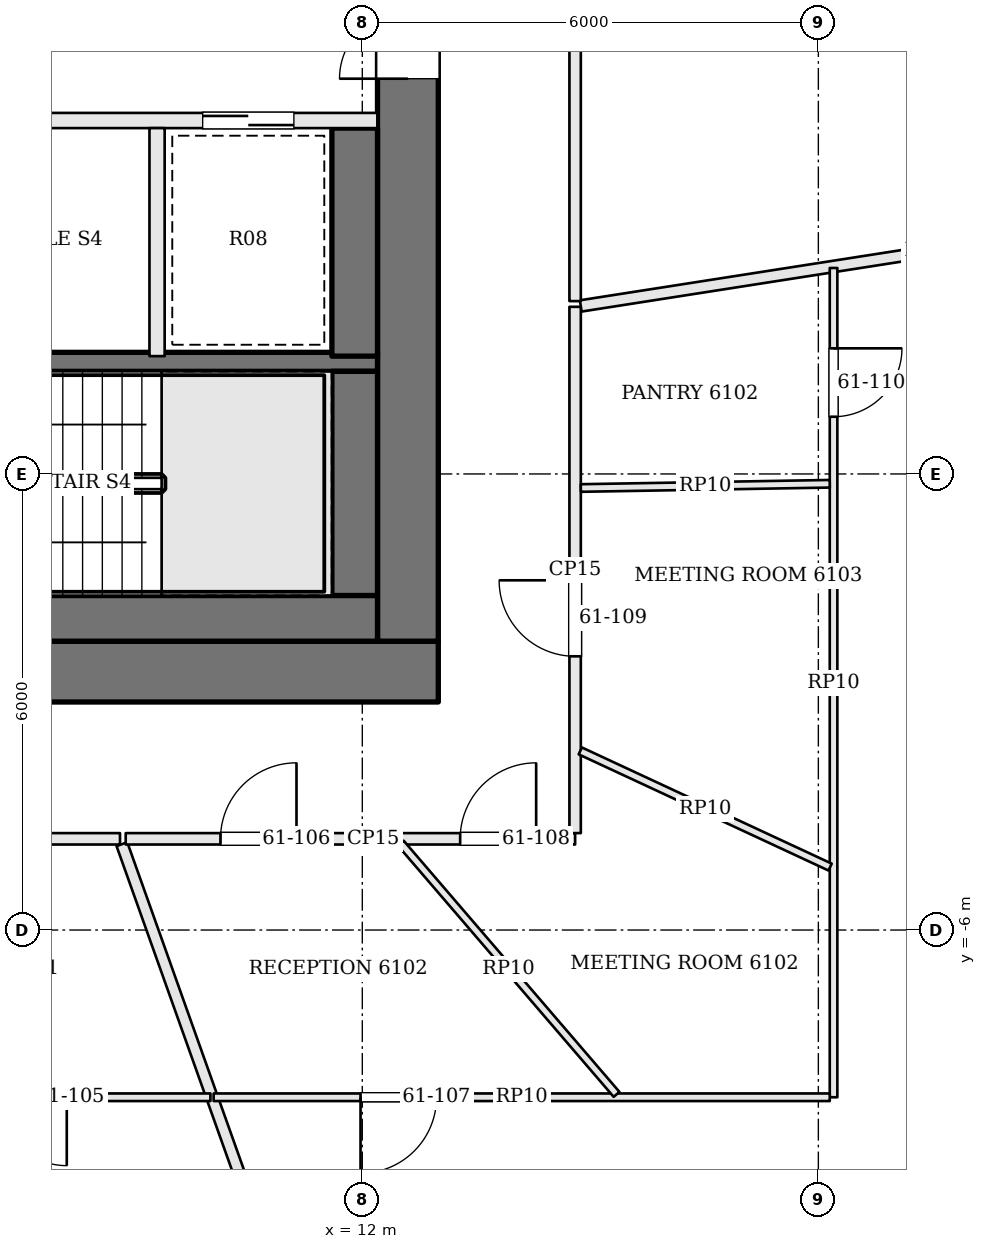
"""IFC4 building model, lengths in metres.
Left out: names, types, materials, properties, quantities, classifications, styles, units other than length and angle.
Written with IfcOpenShell. Run it as: python <this file> out.ifc"""

import sys

from ifc_helpers import new_model, si_unit, direction, frame, frame_2d, origin, place, context, subcontext, project, spatial, rectangle, extrude, element, fill, save


model = new_model("IFC4")
c1 = context("Model", 3, precision=1e-05, world=origin(), true_north=direction((0.0, 1.0)))
c2 = subcontext(c1, "Body", "Model", "MODEL_VIEW")
j1 = project(units=[si_unit("LENGTHUNIT", "METRE"), si_unit("PLANEANGLEUNIT", "RADIAN")], contexts=[c1])
p1 = place(None, origin())
s1 = spatial("IfcSite", under=j1, at=p1, CompositionType="ELEMENT")
p2 = place(p1, origin())
s2 = spatial("IfcBuilding", under=s1, at=p2, CompositionType="ELEMENT")
p3 = place(p2, frame((0.0, 0.0, 248.7)))
s3 = spatial("IfcBuildingStorey", under=s2, at=p3, CompositionType="ELEMENT", Elevation=248.7)
p4 = place(p3, frame((-13.0, -2.6, 0.0), z_axis=(0.0, 0.0, 1.0), x_axis=(1.0, 0.0, 0.0)))
e1 = element("IfcWall", 1, at=p4, inside=s3, PredefinedType="SHEAR", context=c2, shape_type="SweptSolid", body=[
    extrude(rectangle(XDim=26.0, YDim=0.8, at=frame_2d((13.0, 0.0))), origin(), (0.0, 0.0, 1.0), 3.9),
])
p5 = place(p4, frame((9.475, 0.0, 0.0)))
e2 = element("IfcOpeningElement", 2, at=p5, cuts=e1, PredefinedType="OPENING", context=c2, shape_type="SweptSolid", body=[
    extrude(rectangle(XDim=0.9, YDim=2.1, at=frame_2d((0.45, 1.05))), frame((0.0, 0.41, 0.0), z_axis=(0.0, -1.0, 0.0), x_axis=(1.0, 0.0, 0.0)), (0.0, 0.0, 1.0), 0.82),
])
p6 = place(p4, frame((12.75, 0.0, 0.0)))
e3 = element("IfcOpeningElement", 3, at=p6, cuts=e1, PredefinedType="OPENING", context=c2, shape_type="SweptSolid", body=[
    extrude(rectangle(XDim=0.9, YDim=2.1, at=frame_2d((0.45, 1.05))), frame((0.0, 0.41, 0.0), z_axis=(0.0, -1.0, 0.0), x_axis=(1.0, 0.0, 0.0)), (0.0, 0.0, 1.0), 0.82),
])
p7 = place(p4, frame((15.05, 0.0, 0.0)))
e4 = element("IfcOpeningElement", 4, at=p7, cuts=e1, PredefinedType="OPENING", context=c2, shape_type="SweptSolid", body=[
    extrude(rectangle(XDim=1.0, YDim=2.1, at=frame_2d((0.5, 1.05))), frame((0.0, 0.41, 0.0), z_axis=(0.0, -1.0, 0.0), x_axis=(1.0, 0.0, 0.0)), (0.0, 0.0, 1.0), 0.82),
])
p8 = place(p4, frame((16.825, 0.0, 0.0)))
e5 = element("IfcOpeningElement", 5, at=p8, cuts=e1, PredefinedType="OPENING", context=c2, shape_type="SweptSolid", body=[
    extrude(rectangle(XDim=0.7, YDim=2.1, at=frame_2d((0.35, 1.05))), frame((0.0, 0.41, 0.0), z_axis=(0.0, -1.0, 0.0), x_axis=(1.0, 0.0, 0.0)), (0.0, 0.0, 1.0), 0.82),
])
p9 = place(p3, frame((12.6, -2.2, 0.0), z_axis=(0.0, 0.0, 1.0), x_axis=(0.0, 1.0, 0.0)))
e6 = element("IfcWall", 6, at=p9, inside=s3, PredefinedType="SHEAR", context=c2, shape_type="SweptSolid", body=[
    extrude(rectangle(XDim=13.4, YDim=0.8, at=frame_2d((6.7, 0.0))), origin(), (0.0, 0.0, 1.0), 3.9),
])
p10 = place(p9, frame((7.4, 0.0, 0.0)))
e7 = element("IfcOpeningElement", 7, at=p10, cuts=e6, PredefinedType="OPENING", context=c2, shape_type="SweptSolid", body=[
    extrude(rectangle(XDim=1.8, YDim=2.1, at=frame_2d((0.9, 1.05))), frame((0.0, 0.41, 0.0), z_axis=(0.0, -1.0, 0.0), x_axis=(1.0, 0.0, 0.0)), (0.0, 0.0, 1.0), 0.82),
])
p11 = place(p3, frame((12.2, 4.65, 0.0), z_axis=(0.0, 0.0, 1.0), x_axis=(-1.0, 0.0, 0.0)))
e8 = element("IfcWall", 8, at=p11, inside=s3, PredefinedType="SOLIDWALL", context=c2, shape_type="SweptSolid", body=[
    extrude(rectangle(XDim=7.1, YDim=0.2, at=frame_2d((3.55, 0.0))), origin(), (0.0, 0.0, 1.0), 3.7),
])
p12 = place(p11, frame((4.4, 0.0, 0.0)))
e9 = element("IfcOpeningElement", 9, at=p12, cuts=e8, PredefinedType="OPENING", context=c2, shape_type="SweptSolid", body=[
    extrude(rectangle(XDim=1.2, YDim=2.1, at=frame_2d((0.6, 1.05))), frame((0.0, 0.11, 0.0), z_axis=(0.0, -1.0, 0.0), x_axis=(1.0, 0.0, 0.0)), (0.0, 0.0, 1.0), 0.22),
])
p13 = place(p11, frame((1.1, 0.0, 0.0)))
e10 = element("IfcOpeningElement", 10, at=p13, cuts=e8, PredefinedType="OPENING", context=c2, shape_type="SweptSolid", body=[
    extrude(rectangle(XDim=1.2, YDim=2.1, at=frame_2d((0.6, 1.05))), frame((0.0, 0.11, 0.0), z_axis=(0.0, -1.0, 0.0), x_axis=(1.0, 0.0, 0.0)), (0.0, 0.0, 1.0), 0.22),
])
p14 = place(p3, frame((12.2, 1.475, 0.0), z_axis=(0.0, 0.0, 1.0), x_axis=(-1.0, 0.0, 0.0)))
e11 = element("IfcWall", 11, at=p14, inside=s3, PredefinedType="SOLIDWALL", context=c2, shape_type="SweptSolid", body=[
    extrude(rectangle(XDim=7.1, YDim=0.25, at=frame_2d((3.55, 0.0))), origin(), (0.0, 0.0, 1.0), 3.7),
])
p15 = place(p14, frame((5.8, 0.0, 0.0)))
e12 = element("IfcOpeningElement", 12, at=p15, cuts=e11, PredefinedType="OPENING", context=c2, shape_type="SweptSolid", body=[
    extrude(rectangle(XDim=1.2, YDim=2.1, at=frame_2d((0.6, 1.05))), frame((0.0, 0.135, 0.0), z_axis=(0.0, -1.0, 0.0), x_axis=(1.0, 0.0, 0.0)), (0.0, 0.0, 1.0), 0.27),
])
p16 = place(p3, frame((9.3, 4.55, 0.0), z_axis=(0.0, 0.0, 1.0), x_axis=(0.0, -1.0, 0.0)))
e13 = element("IfcWall", 13, at=p16, inside=s3, PredefinedType="SOLIDWALL", context=c2, shape_type="SweptSolid", body=[
    extrude(rectangle(XDim=3.0, YDim=0.2, at=frame_2d((1.5, 0.0))), origin(), (0.0, 0.0, 1.0), 3.7),
])
p17 = place(p3, frame((11.9, 4.55, 0.0), z_axis=(0.0, 0.0, 1.0), x_axis=(0.0, -1.0, 0.0)))
e14 = element("IfcWall", 14, at=p17, inside=s3, PredefinedType="SOLIDWALL", context=c2, shape_type="SweptSolid", body=[
    extrude(rectangle(XDim=3.0, YDim=0.6, at=frame_2d((1.5, 0.0))), origin(), (0.0, 0.0, 1.0), 3.7),
])
p18 = place(p3, frame((11.9, 1.35, 0.0), z_axis=(0.0, 0.0, 1.0), x_axis=(0.0, -1.0, 0.0)))
e15 = element("IfcWall", 15, at=p18, inside=s3, PredefinedType="SOLIDWALL", context=c2, shape_type="SweptSolid", body=[
    extrude(rectangle(XDim=2.95, YDim=0.6, at=frame_2d((1.475, 0.0))), origin(), (0.0, 0.0, 1.0), 3.7),
])
p19 = place(p3, frame((12.2, -1.9, 0.0), z_axis=(0.0, 0.0, 1.0), x_axis=(-1.0, 0.0, 0.0)))
e16 = element("IfcWall", 16, at=p19, inside=s3, PredefinedType="SOLIDWALL", context=c2, shape_type="SweptSolid", body=[
    extrude(rectangle(XDim=7.1, YDim=0.6, at=frame_2d((3.55, 0.0))), origin(), (0.0, 0.0, 1.0), 3.7),
])
p20 = place(p3, frame((-4.444, -4.8, 0.0), z_axis=(0.0, 0.0, 1.0), x_axis=(1.0, 0.0, 0.0)))
e17 = element("IfcWall", 17, at=p20, inside=s3, PredefinedType="PARTITIONING", context=c2, shape_type="SweptSolid", body=[
    extrude(rectangle(XDim=13.256, YDim=0.15, at=frame_2d((6.628, 0.0))), origin(), (0.0, 0.0, 1.0), 3.084),
])
p21 = place(p20, frame((1.31, 0.0, 0.0)))
e18 = element("IfcOpeningElement", 18, at=p21, cuts=e17, PredefinedType="OPENING", context=c2, shape_type="SweptSolid", body=[
    extrude(rectangle(XDim=1.8, YDim=2.1, at=frame_2d((0.9, 1.05))), frame((0.0, 0.085, 0.0), z_axis=(0.0, -1.0, 0.0), x_axis=(1.0, 0.0, 0.0)), (0.0, 0.0, 1.0), 0.17),
])
p22 = place(p20, frame((6.277, 0.0, 0.0)))
e19 = element("IfcOpeningElement", 19, at=p22, cuts=e17, PredefinedType="OPENING", context=c2, shape_type="SweptSolid", body=[
    extrude(rectangle(XDim=1.0, YDim=2.4, at=frame_2d((0.5, 1.2))), frame((0.0, 0.085, 0.0), z_axis=(0.0, -1.0, 0.0), x_axis=(1.0, 0.0, 0.0)), (0.0, 0.0, 1.0), 0.17),
])
p23 = place(p3, frame((13.483, -17.916, 0.0), z_axis=(0.0, 0.0, 1.0), x_axis=(-0.335482994468, 0.942046262358, 0.0)))
e20 = element("IfcWall", 20, at=p23, inside=s3, PredefinedType="PARTITIONING", context=c2, shape_type="SweptSolid", body=[
    extrude(rectangle(XDim=13.848, YDim=0.15, at=frame_2d((6.924, 0.0))), origin(), (0.0, 0.0, 1.0), 3.084),
])
p24 = place(p3, frame((8.887, -4.8, 0.0), z_axis=(0.0, 0.0, 1.0), x_axis=(1.0, 0.0, 0.0)))
e21 = element("IfcWall", 21, at=p24, inside=s3, PredefinedType="PARTITIONING", context=c2, shape_type="SweptSolid", body=[
    extrude(rectangle(XDim=5.913, YDim=0.15, at=frame_2d((2.956, 0.0))), origin(), (0.0, 0.0, 1.0), 3.084),
])
p25 = place(p24, frame((1.247, 0.0, 0.0)))
e22 = element("IfcOpeningElement", 22, at=p25, cuts=e21, PredefinedType="OPENING", context=c2, shape_type="SweptSolid", body=[
    extrude(rectangle(XDim=1.0, YDim=2.1, at=frame_2d((0.5, 1.05))), frame((0.0, 0.085, 0.0), z_axis=(0.0, -1.0, 0.0), x_axis=(1.0, 0.0, 0.0)), (0.0, 0.0, 1.0), 0.17),
])
p26 = place(p24, frame((4.4, 0.0, 0.0)))
e23 = element("IfcOpeningElement", 23, at=p26, cuts=e21, PredefinedType="OPENING", context=c2, shape_type="SweptSolid", body=[
    extrude(rectangle(XDim=1.0, YDim=2.4, at=frame_2d((0.5, 1.2))), frame((0.0, 0.085, 0.0), z_axis=(0.0, -1.0, 0.0), x_axis=(1.0, 0.0, 0.0)), (0.0, 0.0, 1.0), 0.17),
])
p27 = place(p3, frame((14.8, -4.725, 0.0), z_axis=(0.0, 0.0, 1.0), x_axis=(0.0, 1.0, 0.0)))
e24 = element("IfcWall", 24, at=p27, inside=s3, PredefinedType="PARTITIONING", context=c2, shape_type="SweptSolid", body=[
    extrude(rectangle(XDim=6.924, YDim=0.15, at=frame_2d((3.462, 0.0))), origin(), (0.0, 0.0, 1.0), 3.084),
])
p28 = place(p27, frame((2.326, 0.0, 0.0)))
e25 = element("IfcOpeningElement", 25, at=p28, cuts=e24, PredefinedType="OPENING", context=c2, shape_type="SweptSolid", body=[
    extrude(rectangle(XDim=1.0, YDim=2.4, at=frame_2d((0.5, 1.2))), frame((0.0, 0.085, 0.0), z_axis=(0.0, -1.0, 0.0), x_axis=(1.0, 0.0, 0.0)), (0.0, 0.0, 1.0), 0.17),
])
p29 = place(p3, frame((24.077, 3.648, 0.0), z_axis=(0.0, 0.0, 1.0), x_axis=(-0.988026771809, -0.154282527163, 0.0)))
e26 = element("IfcWall", 26, at=p29, inside=s3, PredefinedType="PARTITIONING", context=c2, shape_type="SweptSolid", body=[
    extrude(rectangle(XDim=9.314, YDim=0.15, at=frame_2d((4.657, 0.0))), origin(), (0.0, 0.0, 1.0), 3.084),
])
p30 = place(p3, frame((14.8, 2.274, 0.0), z_axis=(0.0, 0.0, 1.0), x_axis=(0.0, 1.0, 0.0)))
e27 = element("IfcWall", 27, at=p30, inside=s3, PredefinedType="PARTITIONING", context=c2, shape_type="SweptSolid", body=[
    extrude(rectangle(XDim=11.526, YDim=0.15, at=frame_2d((5.763, 0.0))), origin(), (0.0, 0.0, 1.0), 3.084),
])
p31 = place(p30, frame((9.2, 0.0, 0.0)))
e28 = element("IfcOpeningElement", 28, at=p31, cuts=e27, PredefinedType="OPENING", context=c2, shape_type="SweptSolid", body=[
    extrude(rectangle(XDim=1.8, YDim=2.1, at=frame_2d((0.9, 1.05))), frame((0.0, 0.085, 0.0), z_axis=(0.0, -1.0, 0.0), x_axis=(1.0, 0.0, 0.0)), (0.0, 0.0, 1.0), 0.17),
])
p32 = place(p3, frame((10.002, -8.2, 0.0), z_axis=(0.0, 0.0, 1.0), x_axis=(-1.0, 0.0, 0.0)))
e29 = element("IfcWall", 29, at=p32, inside=s3, PredefinedType="PARTITIONING", context=c2, shape_type="SweptSolid", body=[
    extrude(rectangle(XDim=14.884, YDim=0.1, at=frame_2d((7.442, 0.0))), origin(), (0.0, 0.0, 1.0), 3.084),
])
p33 = place(p32, frame((11.857, 0.0, 0.0)))
e30 = element("IfcOpeningElement", 30, at=p33, cuts=e29, PredefinedType="OPENING", context=c2, shape_type="SweptSolid", body=[
    extrude(rectangle(XDim=1.0, YDim=2.1, at=frame_2d((0.5, 1.05))), frame((0.0, 0.06, 0.0), z_axis=(0.0, -1.0, 0.0), x_axis=(1.0, 0.0, 0.0)), (0.0, 0.0, 1.0), 0.12),
])
p34 = place(p32, frame((1.89, 0.0, 0.0)))
e31 = element("IfcOpeningElement", 31, at=p34, cuts=e29, PredefinedType="OPENING", context=c2, shape_type="SweptSolid", body=[
    extrude(rectangle(XDim=0.9, YDim=2.1, at=frame_2d((0.45, 1.05))), frame((0.0, 0.06, 0.0), z_axis=(0.0, -1.0, 0.0), x_axis=(1.0, 0.0, 0.0)), (0.0, 0.0, 1.0), 0.12),
])
p35 = place(p3, frame((18.2, 2.71, 0.0), z_axis=(0.0, 0.0, 1.0), x_axis=(0.0, -1.0, 0.0)))
e32 = element("IfcWall", 32, at=p35, inside=s3, PredefinedType="PARTITIONING", context=c2, shape_type="SweptSolid", body=[
    extrude(rectangle(XDim=10.91, YDim=0.1, at=frame_2d((5.455, 0.0))), origin(), (0.0, 0.0, 1.0), 3.084),
])
p36 = place(p35, frame((1.057, 0.0, 0.0)))
e33 = element("IfcOpeningElement", 33, at=p36, cuts=e32, PredefinedType="OPENING", context=c2, shape_type="SweptSolid", body=[
    extrude(rectangle(XDim=0.9, YDim=2.1, at=frame_2d((0.45, 1.05))), frame((0.0, 0.06, 0.0), z_axis=(0.0, -1.0, 0.0), x_axis=(1.0, 0.0, 0.0)), (0.0, 0.0, 1.0), 0.12),
])
p37 = place(p3, frame((18.15, -8.2, 0.0), z_axis=(0.0, 0.0, 1.0), x_axis=(-1.0, 0.0, 0.0)))
e34 = element("IfcWall", 34, at=p37, inside=s3, PredefinedType="PARTITIONING", context=c2, shape_type="SweptSolid", body=[
    extrude(rectangle(XDim=8.105, YDim=0.1, at=frame_2d((4.053, 0.0))), origin(), (0.0, 0.0, 1.0), 3.084),
])
p38 = place(p37, frame((5.173, 0.0, 0.0)))
e35 = element("IfcOpeningElement", 35, at=p38, cuts=e34, PredefinedType="OPENING", context=c2, shape_type="SweptSolid", body=[
    extrude(rectangle(XDim=1.0, YDim=2.1, at=frame_2d((0.5, 1.05))), frame((0.0, 0.06, 0.0), z_axis=(0.0, -1.0, 0.0), x_axis=(1.0, 0.0, 0.0)), (0.0, 0.0, 1.0), 0.12),
])
p39 = place(p3, frame((12.506, -4.857, 0.0), z_axis=(0.0, 0.0, 1.0), x_axis=(0.651598528349, -0.758564010387, 0.0)))
e36 = element("IfcWall", 36, at=p39, inside=s3, PredefinedType="PARTITIONING", context=c2, shape_type="SweptSolid", body=[
    extrude(rectangle(XDim=4.357, YDim=0.1, at=frame_2d((2.179, 0.0))), origin(), (0.0, 0.0, 1.0), 3.084),
])
p40 = place(p3, frame((14.868, -3.644, 0.0), z_axis=(0.0, 0.0, 1.0), x_axis=(0.906769022566, -0.421627726455, 0.0)))
e37 = element("IfcWall", 37, at=p40, inside=s3, PredefinedType="PARTITIONING", context=c2, shape_type="SweptSolid", body=[
    extrude(rectangle(XDim=3.625, YDim=0.1, at=frame_2d((1.812, 0.0))), origin(), (0.0, 0.0, 1.0), 3.084),
])
p41 = place(p3, frame((14.875, -0.185, 0.0), z_axis=(0.0, 0.0, 1.0), x_axis=(0.999854310099, 0.017069228941, 0.0)))
e38 = element("IfcWall", 38, at=p41, inside=s3, PredefinedType="PARTITIONING", context=c2, shape_type="SweptSolid", body=[
    extrude(rectangle(XDim=3.275, YDim=0.1, at=frame_2d((1.638, 0.0))), origin(), (0.0, 0.0, 1.0), 3.084),
])
p42 = place(p10, origin())
e39 = element("IfcDoor", 39, at=p42, inside=s3, OperationType="DOUBLE_DOOR_SINGLE_SWING", PredefinedType="DOOR", context=c2, shape_type="SweptSolid", body=[
    extrude(rectangle(XDim=1.8, YDim=2.1, at=frame_2d((0.9, 1.05))), frame((0.0, 0.025, 0.0), z_axis=(0.0, -1.0, 0.0), x_axis=(1.0, 0.0, 0.0)), (0.0, 0.0, 1.0), 0.05),
])
fill(e7, e39)
p43 = place(p13, origin())
e40 = element("IfcDoor", 40, at=p43, inside=s3, OperationType="SLIDING_TO_RIGHT", PredefinedType="DOOR", context=c2, shape_type="SweptSolid", body=[
    extrude(rectangle(XDim=1.2, YDim=2.1, at=frame_2d((0.6, 1.05))), frame((0.0, 0.025, 0.0), z_axis=(0.0, -1.0, 0.0), x_axis=(1.0, 0.0, 0.0)), (0.0, 0.0, 1.0), 0.05),
])
fill(e10, e40)
p44 = place(p34, origin())
e41 = element("IfcDoor", 41, at=p44, inside=s3, OperationType="SINGLE_SWING_LEFT", PredefinedType="DOOR", context=c2, shape_type="SweptSolid", body=[
    extrude(rectangle(XDim=0.9, YDim=2.1, at=frame_2d((0.45, 1.05))), frame((0.0, 0.025, 0.0), z_axis=(0.0, -1.0, 0.0), x_axis=(1.0, 0.0, 0.0)), (0.0, 0.0, 1.0), 0.05),
])
fill(e31, e41)
p45 = place(p25, origin())
e42 = element("IfcDoor", 42, at=p45, inside=s3, OperationType="SINGLE_SWING_RIGHT", PredefinedType="DOOR", context=c2, shape_type="SweptSolid", body=[
    extrude(rectangle(XDim=1.0, YDim=2.1, at=frame_2d((0.5, 1.05))), frame((0.0, 0.025, 0.0), z_axis=(0.0, -1.0, 0.0), x_axis=(1.0, 0.0, 0.0)), (0.0, 0.0, 1.0), 0.05),
])
fill(e22, e42)
p46 = place(p38, origin())
e43 = element("IfcDoor", 43, at=p46, inside=s3, OperationType="SINGLE_SWING_RIGHT", PredefinedType="DOOR", context=c2, shape_type="SweptSolid", body=[
    extrude(rectangle(XDim=1.0, YDim=2.1, at=frame_2d((0.5, 1.05))), frame((0.0, 0.025, 0.0), z_axis=(0.0, -1.0, 0.0), x_axis=(1.0, 0.0, 0.0)), (0.0, 0.0, 1.0), 0.05),
])
fill(e35, e43)
p47 = place(p26, origin())
e44 = element("IfcDoor", 44, at=p47, inside=s3, OperationType="SINGLE_SWING_RIGHT", PredefinedType="DOOR", context=c2, shape_type="SweptSolid", body=[
    extrude(rectangle(XDim=1.0, YDim=2.4, at=frame_2d((0.5, 1.2))), frame((0.0, 0.025, 0.0), z_axis=(0.0, -1.0, 0.0), x_axis=(1.0, 0.0, 0.0)), (0.0, 0.0, 1.0), 0.05),
])
fill(e23, e44)
p48 = place(p28, origin())
e45 = element("IfcDoor", 45, at=p48, inside=s3, OperationType="SINGLE_SWING_RIGHT", PredefinedType="DOOR", context=c2, shape_type="SweptSolid", body=[
    extrude(rectangle(XDim=1.0, YDim=2.4, at=frame_2d((0.5, 1.2))), frame((0.0, 0.025, 0.0), z_axis=(0.0, -1.0, 0.0), x_axis=(1.0, 0.0, 0.0)), (0.0, 0.0, 1.0), 0.05),
])
fill(e25, e45)
p49 = place(p36, origin())
e46 = element("IfcDoor", 46, at=p49, inside=s3, OperationType="SINGLE_SWING_LEFT", PredefinedType="DOOR", context=c2, shape_type="SweptSolid", body=[
    extrude(rectangle(XDim=0.9, YDim=2.1, at=frame_2d((0.45, 1.05))), frame((0.0, 0.025, 0.0), z_axis=(0.0, -1.0, 0.0), x_axis=(1.0, 0.0, 0.0)), (0.0, 0.0, 1.0), 0.05),
])
fill(e33, e46)
save(model, sys.argv[1])
